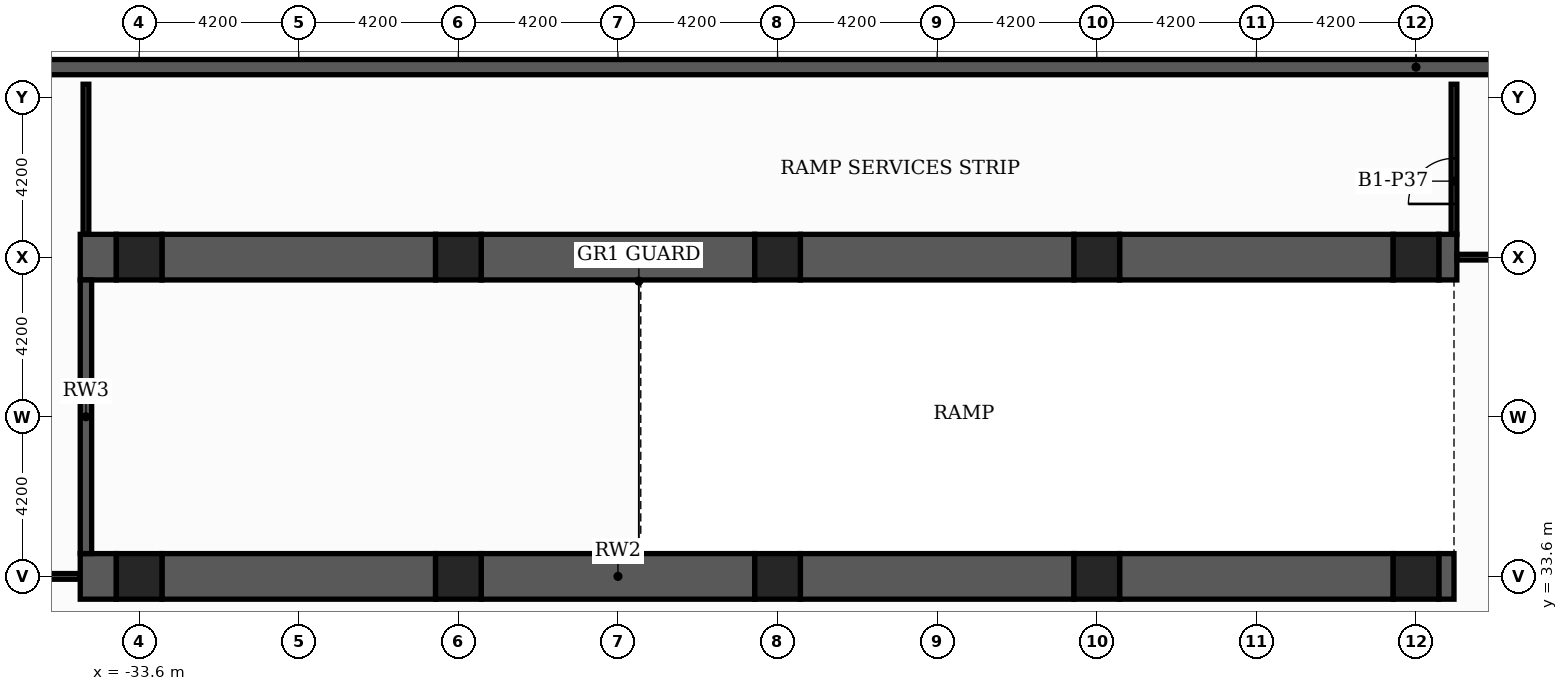
"""IFC4 building model, lengths in metres.
Left out: names, types, materials, properties, quantities, classifications, styles, units other than length and angle.
Written with IfcOpenShell. Run it as: python <this file> out.ifc"""

import sys

from ifc_helpers import new_model, si_unit, direction, frame, frame_2d, origin, origin_2d, place, context, subcontext, project, spatial, rectangle, extrude, element, fill, save


model = new_model("IFC4")
c1 = context("Model", 3, precision=1e-05, world=origin(), true_north=direction((0.0, 1.0)))
c2 = subcontext(c1, "Body", "Model", "MODEL_VIEW")
j1 = project(units=[si_unit("LENGTHUNIT", "METRE"), si_unit("PLANEANGLEUNIT", "RADIAN")], contexts=[c1])
p1 = place(None, origin())
s1 = spatial("IfcSite", under=j1, at=p1, CompositionType="ELEMENT")
p2 = place(p1, origin())
s2 = spatial("IfcBuilding", under=s1, at=p2, CompositionType="ELEMENT")
p3 = place(p2, frame((0.0, 0.0, -4.2)))
s3 = spatial("IfcBuildingStorey", under=s2, at=p3, CompositionType="ELEMENT", Elevation=-4.2)
p4 = place(p3, frame((-47.2, 47.0, 0.0), z_axis=(0.0, 0.0, 1.0), x_axis=(1.0, 0.0, 0.0)))
e1 = element("IfcWall", 1, at=p4, inside=s3, PredefinedType="USERDEFINED", context=c2, shape_type="SweptSolid", body=[
    extrude(rectangle(XDim=94.4, YDim=0.4, at=frame_2d((47.2, 0.0))), origin(), (0.0, 0.0, 1.0), 4.2),
])
for number, where, z_axis, x_axis in (
    (2, (0.0, 33.6, 0.0), (0.0, 0.0, 1.0), (1.0, 0.0, 0.0)),
    (3, (0.0, 42.0, 0.0), (0.0, 0.0, 1.0), (1.0, 0.0, 0.0)),
    (4, (-8.4, 33.6, 0.0), (0.0, 0.0, 1.0), (1.0, 0.0, 0.0)),
    (5, (-8.4, 42.0, 0.0), (0.0, 0.0, 1.0), (1.0, 0.0, 0.0)),
    (6, (-16.8, 33.6, 0.0), (0.0, 0.0, 1.0), (1.0, 0.0, 0.0)),
    (7, (-16.8, 42.0, 0.0), (0.0, 0.0, 1.0), (1.0, 0.0, 0.0)),
    (8, (-25.2, 33.6, 0.0), (0.0, 0.0, 1.0), (1.0, 0.0, 0.0)),
    (9, (-25.2, 42.0, 0.0), (0.0, 0.0, 1.0), (1.0, 0.0, 0.0)),
    (10, (-33.6, 33.6, 0.0), (0.0, 0.0, 1.0), (1.0, 0.0, 0.0)),
    (11, (-33.6, 42.0, 0.0), (0.0, 0.0, 1.0), (1.0, 0.0, 0.0)),
):
    element("IfcColumn", number, at=place(p3, frame(where, z_axis=z_axis, x_axis=x_axis)), inside=s3, PredefinedType="COLUMN", context=c2, shape_type="SweptSolid", body=[
        extrude(rectangle(XDim=1.2, YDim=1.2, at=origin_2d()), origin(), (0.0, 0.0, 1.0), 4.2),
    ])
p5 = place(p3, frame((-41.4, 33.6, 0.0), z_axis=(0.0, 0.0, 1.0), x_axis=(1.0, 0.0, 0.0)))
e12 = element("IfcWall", 12, at=p5, inside=s3, PredefinedType="PARTITIONING", context=c2, shape_type="SweptSolid", body=[
    extrude(rectangle(XDim=6.25, YDim=0.15, at=frame_2d((3.125, 0.0))), origin(), (0.0, 0.0, 1.0), 3.78),
])
p6 = place(p5, frame((2.9, 0.0, 0.0)))
e13 = element("IfcOpeningElement", 13, at=p6, cuts=e12, PredefinedType="OPENING", context=c2, shape_type="SweptSolid", body=[
    extrude(rectangle(XDim=1.2, YDim=2.2, at=frame_2d((0.6, 1.1))), frame((0.0, 0.085, 0.0), z_axis=(0.0, -1.0, 0.0), x_axis=(1.0, 0.0, 0.0)), (0.0, 0.0, 1.0), 0.17),
])
p7 = place(p3, frame((-35.15, 33.6, 0.0), z_axis=(0.0, 0.0, 1.0), x_axis=(1.0, 0.0, 0.0)))
e14 = element("IfcWall", 14, at=p7, inside=s3, PredefinedType="SOLIDWALL", context=c2, shape_type="SweptSolid", body=[
    extrude(rectangle(XDim=0.95, YDim=1.2, at=frame_2d((0.475, 0.0))), origin(), (0.0, 0.0, 1.0), 3.78),
])
p8 = place(p3, frame((-33.0, 33.6, 0.0), z_axis=(0.0, 0.0, 1.0), x_axis=(1.0, 0.0, 0.0)))
e15 = element("IfcWall", 15, at=p8, inside=s3, PredefinedType="SOLIDWALL", context=c2, shape_type="SweptSolid", body=[
    extrude(rectangle(XDim=7.2, YDim=1.2, at=frame_2d((3.6, 0.0))), origin(), (0.0, 0.0, 1.0), 3.78),
])
p9 = place(p3, frame((-24.6, 33.6, 0.0), z_axis=(0.0, 0.0, 1.0), x_axis=(1.0, 0.0, 0.0)))
e16 = element("IfcWall", 16, at=p9, inside=s3, PredefinedType="SOLIDWALL", context=c2, shape_type="SweptSolid", body=[
    extrude(rectangle(XDim=7.2, YDim=1.2, at=frame_2d((3.6, 0.0))), origin(), (0.0, 0.0, 1.0), 3.78),
])
for number, where, z_axis, x_axis in (
    (17, (-16.2, 33.6, 0.0), (0.0, 0.0, 1.0), (1.0, 0.0, 0.0)),
    (18, (-7.8, 33.6, 0.0), (0.0, 0.0, 1.0), (1.0, 0.0, 0.0)),
):
    element("IfcWall", number, at=place(p3, frame(where, z_axis=z_axis, x_axis=x_axis)), inside=s3, PredefinedType="SOLIDWALL", context=c2, shape_type="SweptSolid", body=[
        extrude(rectangle(XDim=7.2, YDim=1.2, at=frame_2d((3.6, 0.0))), origin(), (0.0, 0.0, 1.0), 3.78),
    ])
p10 = place(p3, frame((0.6, 33.6, 0.0), z_axis=(0.0, 0.0, 1.0), x_axis=(1.0, 0.0, 0.0)))
e19 = element("IfcWall", 19, at=p10, inside=s3, PredefinedType="SOLIDWALL", context=c2, shape_type="SweptSolid", body=[
    extrude(rectangle(XDim=0.4, YDim=1.2, at=frame_2d((0.2, 0.0))), origin(), (0.0, 0.0, 1.0), 3.78),
])
p11 = place(p3, frame((-35.15, 42.0, 0.0), z_axis=(0.0, 0.0, 1.0), x_axis=(1.0, 0.0, 0.0)))
e20 = element("IfcWall", 20, at=p11, inside=s3, PredefinedType="SOLIDWALL", context=c2, shape_type="SweptSolid", body=[
    extrude(rectangle(XDim=0.95, YDim=1.2, at=frame_2d((0.475, 0.0))), origin(), (0.0, 0.0, 1.0), 3.78),
])
p12 = place(p3, frame((-33.0, 42.0, 0.0), z_axis=(0.0, 0.0, 1.0), x_axis=(1.0, 0.0, 0.0)))
e21 = element("IfcWall", 21, at=p12, inside=s3, PredefinedType="SOLIDWALL", context=c2, shape_type="SweptSolid", body=[
    extrude(rectangle(XDim=7.2, YDim=1.2, at=frame_2d((3.6, 0.0))), origin(), (0.0, 0.0, 1.0), 3.78),
])
p13 = place(p3, frame((-24.6, 42.0, 0.0), z_axis=(0.0, 0.0, 1.0), x_axis=(1.0, 0.0, 0.0)))
e22 = element("IfcWall", 22, at=p13, inside=s3, PredefinedType="SOLIDWALL", context=c2, shape_type="SweptSolid", body=[
    extrude(rectangle(XDim=7.2, YDim=1.2, at=frame_2d((3.6, 0.0))), origin(), (0.0, 0.0, 1.0), 3.78),
])
for number, where, z_axis, x_axis in (
    (23, (-16.2, 42.0, 0.0), (0.0, 0.0, 1.0), (1.0, 0.0, 0.0)),
    (24, (-7.8, 42.0, 0.0), (0.0, 0.0, 1.0), (1.0, 0.0, 0.0)),
):
    element("IfcWall", number, at=place(p3, frame(where, z_axis=z_axis, x_axis=x_axis)), inside=s3, PredefinedType="SOLIDWALL", context=c2, shape_type="SweptSolid", body=[
        extrude(rectangle(XDim=7.2, YDim=1.2, at=frame_2d((3.6, 0.0))), origin(), (0.0, 0.0, 1.0), 3.78),
    ])
p14 = place(p3, frame((0.6, 42.0, 0.0), z_axis=(0.0, 0.0, 1.0), x_axis=(1.0, 0.0, 0.0)))
e25 = element("IfcWall", 25, at=p14, inside=s3, PredefinedType="SOLIDWALL", context=c2, shape_type="SweptSolid", body=[
    extrude(rectangle(XDim=0.475, YDim=1.2, at=frame_2d((0.237, 0.0))), origin(), (0.0, 0.0, 1.0), 3.78),
])
p15 = place(p3, frame((1.075, 42.0, 0.0), z_axis=(0.0, 0.0, 1.0), x_axis=(1.0, 0.0, 0.0)))
e26 = element("IfcWall", 26, at=p15, inside=s3, PredefinedType="PARTITIONING", context=c2, shape_type="SweptSolid", body=[
    extrude(rectangle(XDim=6.25, YDim=0.15, at=frame_2d((3.125, 0.0))), origin(), (0.0, 0.0, 1.0), 3.78),
])
p16 = place(p15, frame((2.525, 0.0, 0.0)))
e27 = element("IfcOpeningElement", 27, at=p16, cuts=e26, PredefinedType="OPENING", context=c2, shape_type="SweptSolid", body=[
    extrude(rectangle(XDim=1.2, YDim=2.2, at=frame_2d((0.6, 1.1))), frame((0.0, 0.085, 0.0), z_axis=(0.0, -1.0, 0.0), x_axis=(1.0, 0.0, 0.0)), (0.0, 0.0, 1.0), 0.17),
])
p17 = place(p3, frame((-35.0, 34.2, 0.0), z_axis=(0.0, 0.0, 1.0), x_axis=(0.0, 1.0, 0.0)))
e28 = element("IfcWall", 28, at=p17, inside=s3, PredefinedType="SOLIDWALL", context=c2, shape_type="SweptSolid", body=[
    extrude(rectangle(XDim=7.2, YDim=0.3, at=frame_2d((3.6, 0.0))), origin(), (0.0, 0.0, 1.0), 3.78),
])
p18 = place(p3, frame((-35.0, 42.6, 0.0), z_axis=(0.0, 0.0, 1.0), x_axis=(0.0, 1.0, 0.0)))
e29 = element("IfcWall", 29, at=p18, inside=s3, PredefinedType="PARTITIONING", context=c2, shape_type="SweptSolid", body=[
    extrude(rectangle(XDim=3.95, YDim=0.15, at=frame_2d((1.975, 0.0))), origin(), (0.0, 0.0, 1.0), 3.78),
])
p19 = place(p3, frame((1.0, 42.6, 0.0), z_axis=(0.0, 0.0, 1.0), x_axis=(0.0, 1.0, 0.0)))
e30 = element("IfcWall", 30, at=p19, inside=s3, PredefinedType="PARTITIONING", context=c2, shape_type="SweptSolid", body=[
    extrude(rectangle(XDim=3.95, YDim=0.15, at=frame_2d((1.975, 0.0))), origin(), (0.0, 0.0, 1.0), 3.78),
])
p20 = place(p19, frame((0.8, 0.0, 0.0)))
e31 = element("IfcOpeningElement", 31, at=p20, cuts=e30, PredefinedType="OPENING", context=c2, shape_type="SweptSolid", body=[
    extrude(rectangle(XDim=1.2, YDim=2.2, at=frame_2d((0.6, 1.1))), frame((0.0, 0.085, 0.0), z_axis=(0.0, -1.0, 0.0), x_axis=(1.0, 0.0, 0.0)), (0.0, 0.0, 1.0), 0.17),
])
p21 = place(p20, origin())
e32 = element("IfcDoor", 32, at=p21, inside=s3, OperationType="SINGLE_SWING_LEFT", PredefinedType="DOOR", context=c2, shape_type="SweptSolid", body=[
    extrude(rectangle(XDim=1.2, YDim=2.2, at=frame_2d((0.6, 1.1))), frame((0.0, 0.025, 0.0), z_axis=(0.0, -1.0, 0.0), x_axis=(1.0, 0.0, 0.0)), (0.0, 0.0, 1.0), 0.05),
])
fill(e31, e32)
save(model, sys.argv[1])
